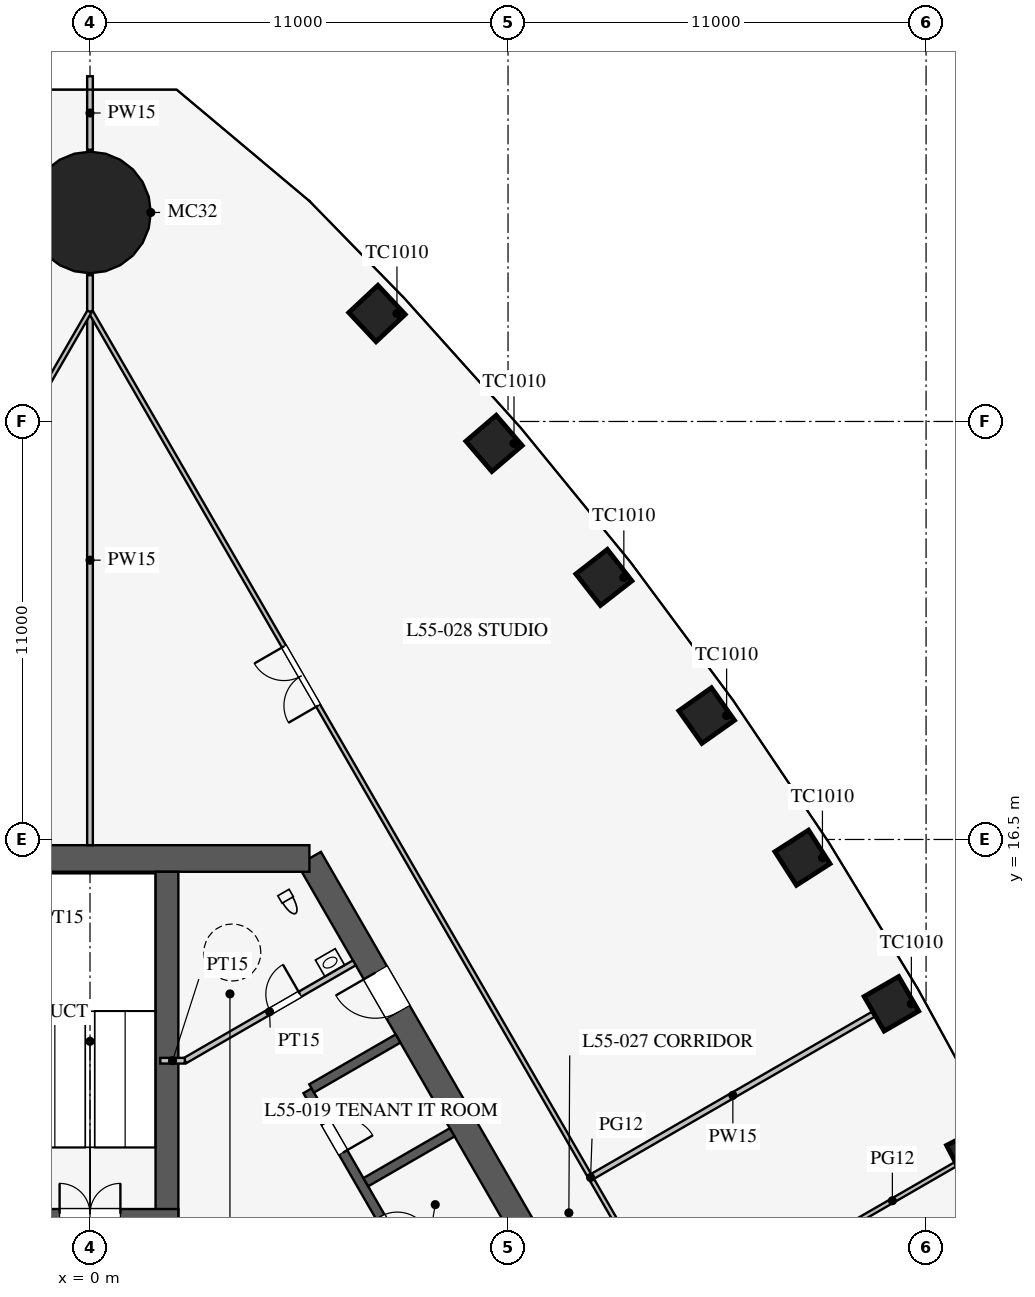
"""IFC4 building model, lengths in metres.
Left out: names, types, materials, properties, quantities, classifications, styles, units other than length and angle.
Written with IfcOpenShell. Run it as: python <this file> out.ifc"""

import sys

from ifc_helpers import new_model, si_unit, direction, frame, frame_2d, origin, origin_2d, place, context, subcontext, project, spatial, rectangle, circle, extrude, element, fill, save


model = new_model("IFC4")
c1 = context("Model", 3, precision=1e-05, world=origin(), true_north=direction((0.0, 1.0)))
c2 = subcontext(c1, "Body", "Model", "MODEL_VIEW")
j1 = project(units=[si_unit("LENGTHUNIT", "METRE"), si_unit("PLANEANGLEUNIT", "RADIAN")], contexts=[c1])
p1 = place(None, origin())
s1 = spatial("IfcSite", under=j1, at=p1, CompositionType="ELEMENT")
p2 = place(p1, origin())
s2 = spatial("IfcBuilding", under=s1, at=p2, CompositionType="ELEMENT")
p3 = place(p2, frame((0.0, 0.0, 240.1)))
s3 = spatial("IfcBuildingStorey", under=s2, at=p3, CompositionType="ELEMENT", Elevation=240.1)
for number, where, z_axis, x_axis in (
    (1, (23.248, 8.226, 0.0), (0.0, 0.0, 1.0), (-0.46, 0.888, 0.0)),
    (2, (21.088, 12.175, 0.0), (0.0, 0.0, 1.0), (-0.5, 0.866, 0.0)),
    (3, (18.748, 16.02, 0.0), (0.0, 0.0, 1.0), (-0.539, 0.842, 0.0)),
    (4, (16.227, 19.761, 0.0), (0.0, 0.0, 1.0), (-0.577, 0.816, 0.0)),
    (5, (13.522, 23.396, 0.0), (0.0, 0.0, 1.0), (-0.615, 0.789, 0.0)),
    (6, (10.632, 26.923, 0.0), (0.0, 0.0, 1.0), (-0.651, 0.759, 0.0)),
    (7, (7.552, 30.341, 0.0), (0.0, 0.0, 1.0), (-0.684, 0.73, 0.0)),
):
    element("IfcColumn", number, at=place(p3, frame(where, z_axis=z_axis, x_axis=x_axis)), inside=s3, PredefinedType="COLUMN", context=c2, shape_type="SweptSolid", body=[
        extrude(rectangle(XDim=1.05, YDim=1.05, at=origin_2d()), origin(), (0.0, 0.0, 1.0), 4.2),
    ])
p4 = place(p3, frame((0.0, 33.0, 0.0), z_axis=(0.0, 0.0, 1.0), x_axis=(1.0, 0.0, 0.0)))
e8 = element("IfcColumn", 8, at=p4, inside=s3, PredefinedType="COLUMN", context=c2, shape_type="SweptSolid", body=[
    extrude(circle(Radius=1.6, at=origin_2d()), origin(), (0.0, 0.0, 1.0), 4.2),
])
p5 = place(p3, frame((16.743, -3.0, 0.0), z_axis=(0.0, 0.0, 1.0), x_axis=(-0.500002442456, 0.866023993627, 0.0)))
e9 = element("IfcWall", 9, at=p5, inside=s3, PredefinedType="SHEAR", context=c2, shape_type="SweptSolid", body=[
    extrude(rectangle(XDim=21.939, YDim=0.7, at=frame_2d((10.97, 0.0))), origin(), (0.0, 0.0, 1.0), 4.2),
])
p6 = place(p5, frame((17.27, 0.0, 0.0)))
e10 = element("IfcOpeningElement", 10, at=p6, cuts=e9, PredefinedType="OPENING", context=c2, shape_type="SweptSolid", body=[
    extrude(rectangle(XDim=1.2, YDim=2.1, at=frame_2d((0.6, 1.05))), frame((0.0, 0.36, 0.0), z_axis=(0.0, -1.0, 0.0), x_axis=(1.0, 0.0, 0.0)), (0.0, 0.0, 1.0), 0.72),
])
p7 = place(p5, frame((3.47, 0.0, 0.0)))
e11 = element("IfcOpeningElement", 11, at=p7, cuts=e9, PredefinedType="OPENING", context=c2, shape_type="SweptSolid", body=[
    extrude(rectangle(XDim=1.2, YDim=2.1, at=frame_2d((0.6, 1.05))), frame((0.0, 0.36, 0.0), z_axis=(0.0, -1.0, 0.0), x_axis=(1.0, 0.0, 0.0)), (0.0, 0.0, 1.0), 0.72),
])
p8 = place(p3, frame((5.773, 16.0, 0.0), z_axis=(0.0, 0.0, 1.0), x_axis=(-1.0, 0.0, 0.0)))
e12 = element("IfcWall", 12, at=p8, inside=s3, PredefinedType="SHEAR", context=c2, shape_type="SweptSolid", body=[
    extrude(rectangle(XDim=11.547, YDim=0.7, at=frame_2d((5.773, 0.0))), origin(), (0.0, 0.0, 1.0), 4.2),
])
p9 = place(p3, frame((11.424, 0.014, 0.0), z_axis=(0.0, 0.0, 1.0), x_axis=(-0.500001763848, 0.866024385424, 0.0)))
e13 = element("IfcWall", 13, at=p9, inside=s3, PredefinedType="SHEAR", context=c2, shape_type="SweptSolid", body=[
    extrude(rectangle(XDim=11.4, YDim=0.25, at=frame_2d((5.7, 0.0))), origin(), (0.0, 0.0, 1.0), 4.2),
])
p10 = place(p9, frame((0.975, 0.0, 0.0)))
e14 = element("IfcOpeningElement", 14, at=p10, cuts=e13, PredefinedType="OPENING", context=c2, shape_type="SweptSolid", body=[
    extrude(rectangle(XDim=0.9, YDim=2.1, at=frame_2d((0.45, 1.05))), frame((0.0, 0.135, 0.0), z_axis=(0.0, -1.0, 0.0), x_axis=(1.0, 0.0, 0.0)), (0.0, 0.0, 1.0), 0.27),
])
p11 = place(p9, frame((3.825, 0.0, 0.0)))
e15 = element("IfcOpeningElement", 15, at=p11, cuts=e13, PredefinedType="OPENING", context=c2, shape_type="SweptSolid", body=[
    extrude(rectangle(XDim=0.9, YDim=2.1, at=frame_2d((0.45, 1.05))), frame((0.0, 0.135, 0.0), z_axis=(0.0, -1.0, 0.0), x_axis=(1.0, 0.0, 0.0)), (0.0, 0.0, 1.0), 0.27),
])
p12 = place(p9, frame((6.675, 0.0, 0.0)))
e16 = element("IfcOpeningElement", 16, at=p12, cuts=e13, PredefinedType="OPENING", context=c2, shape_type="SweptSolid", body=[
    extrude(rectangle(XDim=0.9, YDim=2.1, at=frame_2d((0.45, 1.05))), frame((0.0, 0.135, 0.0), z_axis=(0.0, -1.0, 0.0), x_axis=(1.0, 0.0, 0.0)), (0.0, 0.0, 1.0), 0.27),
])
p13 = place(p9, frame((9.525, 0.0, 0.0)))
e17 = element("IfcOpeningElement", 17, at=p13, cuts=e13, PredefinedType="OPENING", context=c2, shape_type="SweptSolid", body=[
    extrude(rectangle(XDim=0.9, YDim=2.1, at=frame_2d((0.45, 1.05))), frame((0.0, 0.135, 0.0), z_axis=(0.0, -1.0, 0.0), x_axis=(1.0, 0.0, 0.0)), (0.0, 0.0, 1.0), 0.27),
])
for number, where, z_axis, x_axis in (
    (18, (7.257, 7.481, 0.0), (0.0, 0.0, 1.0), (0.866, 0.5, 0.0)),
    (19, (5.832, 9.949, 0.0), (0.0, 0.0, 1.0), (0.866, 0.5, 0.0)),
):
    element("IfcWall", number, at=place(p3, frame(where, z_axis=z_axis, x_axis=x_axis)), inside=s3, PredefinedType="SHEAR", context=c2, shape_type="SweptSolid", body=[
        extrude(rectangle(XDim=2.625, YDim=0.25, at=frame_2d((1.312, 0.0))), origin(), (0.0, 0.0, 1.0), 4.2),
    ])
p14 = place(p3, frame((2.025, 6.525, 0.0), z_axis=(0.0, 0.0, 1.0), x_axis=(0.0, 1.0, 0.0)))
e20 = element("IfcWall", 20, at=p14, inside=s3, PredefinedType="SHEAR", context=c2, shape_type="SweptSolid", body=[
    extrude(rectangle(XDim=9.125, YDim=0.6, at=frame_2d((4.562, 0.0))), origin(), (0.0, 0.0, 1.0), 4.2),
])
p15 = place(p3, frame((2.325, 6.65, 0.0), z_axis=(0.0, 0.0, 1.0), x_axis=(-1.0, 0.0, 0.0)))
e21 = element("IfcWall", 21, at=p15, inside=s3, PredefinedType="SHEAR", context=c2, shape_type="SweptSolid", body=[
    extrude(rectangle(XDim=4.65, YDim=0.25, at=frame_2d((2.325, 0.0))), origin(), (0.0, 0.0, 1.0), 4.2),
])
p16 = place(p15, frame((1.525, 0.0, 0.0)))
e22 = element("IfcOpeningElement", 22, at=p16, cuts=e21, PredefinedType="OPENING", context=c2, shape_type="SweptSolid", body=[
    extrude(rectangle(XDim=1.6, YDim=2.1, at=frame_2d((0.8, 1.05))), frame((0.0, 0.135, 0.0), z_axis=(0.0, -1.0, 0.0), x_axis=(1.0, 0.0, 0.0)), (0.0, 0.0, 1.0), 0.27),
])
p17 = place(p3, frame((2.495, 10.678, 0.0), z_axis=(0.0, 0.0, 1.0), x_axis=(0.866037967349, 0.499978238636, 0.0)))
e23 = element("IfcWall", 23, at=p17, inside=s3, PredefinedType="PARTITIONING", context=c2, shape_type="SweptSolid", body=[
    extrude(rectangle(XDim=5.15, YDim=0.15, at=frame_2d((2.575, 0.0))), origin(), (0.0, 0.0, 1.0), 4.0),
])
p18 = place(p17, frame((2.6, 0.0, 0.0)))
e24 = element("IfcOpeningElement", 24, at=p18, cuts=e23, PredefinedType="OPENING", context=c2, shape_type="SweptSolid", body=[
    extrude(rectangle(XDim=0.9, YDim=2.1, at=frame_2d((0.45, 1.05))), frame((0.0, 0.085, 0.0), z_axis=(0.0, -1.0, 0.0), x_axis=(1.0, 0.0, 0.0)), (0.0, 0.0, 1.0), 0.17),
])
p19 = place(p3, frame((2.495, 10.678, 0.0), z_axis=(0.0, 0.0, 1.0), x_axis=(-1.0, 0.0, 0.0)))
e25 = element("IfcWall", 25, at=p19, inside=s3, PredefinedType="PARTITIONING", context=c2, shape_type="SweptSolid", body=[
    extrude(rectangle(XDim=0.645, YDim=0.15, at=frame_2d((0.323, 0.0))), origin(), (0.0, 0.0, 1.0), 4.0),
])
p20 = place(p3, frame((0.0, 16.35, 0.0), z_axis=(0.0, 0.0, 1.0), x_axis=(0.0, 1.0, 0.0)))
e26 = element("IfcWall", 26, at=p20, inside=s3, PredefinedType="PARTITIONING", context=c2, shape_type="SweptSolid", body=[
    extrude(rectangle(XDim=15.0, YDim=0.15, at=frame_2d((7.5, 0.0))), origin(), (0.0, 0.0, 1.0), 2.4),
])
p21 = place(p3, frame((0.0, 34.65, 0.0), z_axis=(0.0, 0.0, 1.0), x_axis=(0.0, 1.0, 0.0)))
e27 = element("IfcWall", 27, at=p21, inside=s3, PredefinedType="PARTITIONING", context=c2, shape_type="SweptSolid", body=[
    extrude(rectangle(XDim=1.935, YDim=0.15, at=frame_2d((0.967, 0.0))), origin(), (0.0, 0.0, 1.0), 2.4),
])
p22 = place(p3, frame((13.224, 7.635, 0.0), z_axis=(0.0, 0.0, 1.0), x_axis=(0.866035375346, 0.499982728352, 0.0)))
e28 = element("IfcWall", 28, at=p22, inside=s3, PredefinedType="PARTITIONING", context=c2, shape_type="SweptSolid", body=[
    extrude(rectangle(XDim=8.526, YDim=0.15, at=frame_2d((4.263, 0.0))), origin(), (0.0, 0.0, 1.0), 2.992),
])
p23 = place(p3, frame((26.328, -15.182, 0.0), z_axis=(0.0, 0.0, 1.0), x_axis=(-0.500000626146, 0.866025042278, 0.0)))
e29 = element("IfcWall", 29, at=p23, inside=s3, PredefinedType="PARTITIONING", context=c2, shape_type="SweptSolid", body=[
    extrude(rectangle(XDim=52.624, YDim=0.12, at=frame_2d((26.312, 0.0))), origin(), (0.0, 0.0, 1.0), 2.9),
])
p24 = place(p23, frame((10.15, 0.0, 0.15)))
e30 = element("IfcOpeningElement", 30, at=p24, cuts=e29, PredefinedType="OPENING", context=c2, shape_type="SweptSolid", body=[
    extrude(rectangle(XDim=1.8, YDim=2.1, at=frame_2d((0.9, 1.05))), frame((0.0, 0.07, 0.0), z_axis=(0.0, -1.0, 0.0), x_axis=(1.0, 0.0, 0.0)), (0.0, 0.0, 1.0), 0.14),
])
p25 = place(p23, frame((40.65, 0.0, 0.15)))
e31 = element("IfcOpeningElement", 31, at=p25, cuts=e29, PredefinedType="OPENING", context=c2, shape_type="SweptSolid", body=[
    extrude(rectangle(XDim=1.8, YDim=2.1, at=frame_2d((0.9, 1.05))), frame((0.0, 0.07, 0.0), z_axis=(0.0, -1.0, 0.0), x_axis=(1.0, 0.0, 0.0)), (0.0, 0.0, 1.0), 0.14),
])
p26 = place(p3, frame((19.46, 6.039, 0.0), z_axis=(0.0, 0.0, 1.0), x_axis=(0.866031201001, 0.499989958791, 0.0)))
e32 = element("IfcWall", 32, at=p26, inside=s3, PredefinedType="PARTITIONING", context=c2, shape_type="SweptSolid", body=[
    extrude(rectangle(XDim=3.818, YDim=0.12, at=frame_2d((1.909, 0.0))), origin(), (0.0, 0.0, 1.0), 2.9),
])
p27 = place(p3, frame((-0.016, 30.392, 0.0), z_axis=(0.0, 0.0, 1.0), x_axis=(-0.500000626146, -0.866025042278, 0.0)))
e33 = element("IfcWall", 33, at=p27, inside=s3, PredefinedType="PARTITIONING", context=c2, shape_type="SweptSolid", body=[
    extrude(rectangle(XDim=52.624, YDim=0.12, at=frame_2d((26.312, 0.0))), origin(), (0.0, 0.0, 1.0), 2.9),
])
p28 = place(p27, frame((10.15, 0.0, 0.15)))
e34 = element("IfcOpeningElement", 34, at=p28, cuts=e33, PredefinedType="OPENING", context=c2, shape_type="SweptSolid", body=[
    extrude(rectangle(XDim=1.8, YDim=2.1, at=frame_2d((0.9, 1.05))), frame((0.0, 0.07, 0.0), z_axis=(0.0, -1.0, 0.0), x_axis=(1.0, 0.0, 0.0)), (0.0, 0.0, 1.0), 0.14),
])
p29 = place(p27, frame((40.65, 0.0, 0.15)))
e35 = element("IfcOpeningElement", 35, at=p29, cuts=e33, PredefinedType="OPENING", context=c2, shape_type="SweptSolid", body=[
    extrude(rectangle(XDim=1.8, YDim=2.1, at=frame_2d((0.9, 1.05))), frame((0.0, 0.07, 0.0), z_axis=(0.0, -1.0, 0.0), x_axis=(1.0, 0.0, 0.0)), (0.0, 0.0, 1.0), 0.14),
])
p30 = place(p18, origin())
e36 = element("IfcDoor", 36, at=p30, inside=s3, OperationType="SINGLE_SWING_RIGHT", PredefinedType="DOOR", context=c2, shape_type="SweptSolid", body=[
    extrude(rectangle(XDim=0.9, YDim=2.1, at=frame_2d((0.45, 1.05))), frame((0.0, 0.025, 0.0), z_axis=(0.0, -1.0, 0.0), x_axis=(1.0, 0.0, 0.0)), (0.0, 0.0, 1.0), 0.05),
])
fill(e24, e36)
p31 = place(p16, frame((1.6, 0.0, 0.0), z_axis=(0.0, 0.0, 1.0), x_axis=(-1.0, 0.0, 0.0)))
e37 = element("IfcDoor", 37, at=p31, inside=s3, OperationType="DOUBLE_DOOR_SINGLE_SWING", PredefinedType="DOOR", context=c2, shape_type="SweptSolid", body=[
    extrude(rectangle(XDim=1.6, YDim=2.1, at=frame_2d((0.8, 1.05))), frame((0.0, 0.025, 0.0), z_axis=(0.0, -1.0, 0.0), x_axis=(1.0, 0.0, 0.0)), (0.0, 0.0, 1.0), 0.05),
])
fill(e22, e37)
p32 = place(p6, origin())
e38 = element("IfcDoor", 38, at=p32, inside=s3, OperationType="SINGLE_SWING_RIGHT", PredefinedType="DOOR", context=c2, shape_type="SweptSolid", body=[
    extrude(rectangle(XDim=1.2, YDim=2.1, at=frame_2d((0.6, 1.05))), frame((0.0, 0.025, 0.0), z_axis=(0.0, -1.0, 0.0), x_axis=(1.0, 0.0, 0.0)), (0.0, 0.0, 1.0), 0.05),
])
fill(e10, e38)
p33 = place(p12, frame((0.9, 0.0, 0.0), z_axis=(0.0, 0.0, 1.0), x_axis=(-1.0, 0.0, 0.0)))
e39 = element("IfcDoor", 39, at=p33, inside=s3, OperationType="SINGLE_SWING_RIGHT", PredefinedType="DOOR", context=c2, shape_type="SweptSolid", body=[
    extrude(rectangle(XDim=0.9, YDim=2.1, at=frame_2d((0.45, 1.05))), frame((0.0, 0.025, 0.0), z_axis=(0.0, -1.0, 0.0), x_axis=(1.0, 0.0, 0.0)), (0.0, 0.0, 1.0), 0.05),
])
fill(e16, e39)
p34 = place(p13, frame((0.9, 0.0, 0.0), z_axis=(0.0, 0.0, 1.0), x_axis=(-1.0, 0.0, 0.0)))
e40 = element("IfcDoor", 40, at=p34, inside=s3, OperationType="SINGLE_SWING_RIGHT", PredefinedType="DOOR", context=c2, shape_type="SweptSolid", body=[
    extrude(rectangle(XDim=0.9, YDim=2.1, at=frame_2d((0.45, 1.05))), frame((0.0, 0.025, 0.0), z_axis=(0.0, -1.0, 0.0), x_axis=(1.0, 0.0, 0.0)), (0.0, 0.0, 1.0), 0.05),
])
fill(e17, e40)
p35 = place(p25, origin())
e41 = element("IfcDoor", 41, at=p35, inside=s3, OperationType="DOUBLE_DOOR_SINGLE_SWING", PredefinedType="DOOR", context=c2, shape_type="SweptSolid", body=[
    extrude(rectangle(XDim=1.8, YDim=2.1, at=frame_2d((0.9, 1.05))), frame((0.0, 0.025, 0.0), z_axis=(0.0, -1.0, 0.0), x_axis=(1.0, 0.0, 0.0)), (0.0, 0.0, 1.0), 0.05),
])
fill(e31, e41)
save(model, sys.argv[1])
